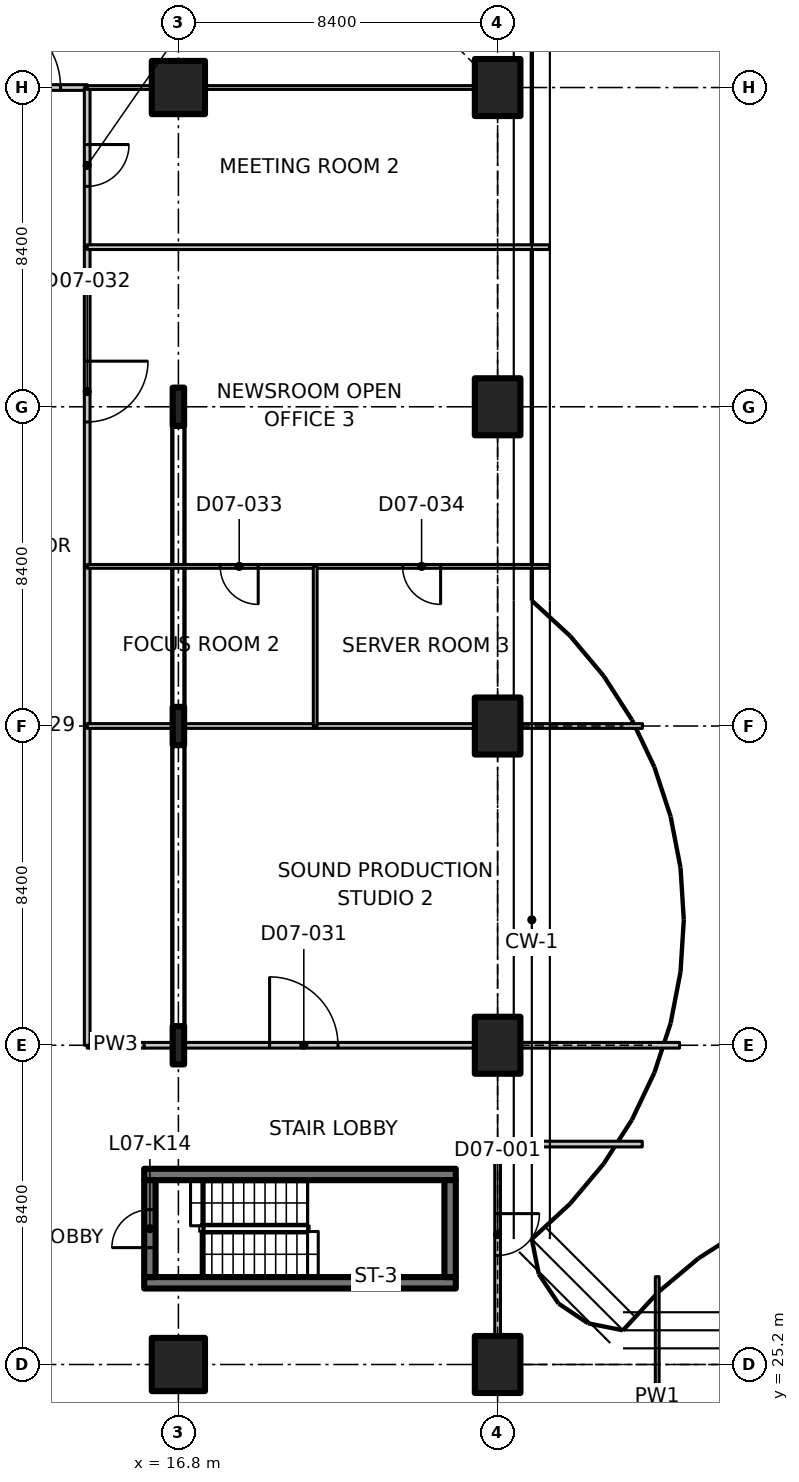
"""IFC4 building model, lengths in metres.
Left out: names, types, materials, properties, quantities, classifications, styles, units other than length and angle.
Written with IfcOpenShell. Run it as: python <this file> out.ifc"""

import sys

from ifc_helpers import new_model, si_unit, direction, frame, frame_2d, origin, origin_2d, place, context, subcontext, project, spatial, polyline, rectangle, i_section, outline, extrude, element, fill, save


model = new_model("IFC4")
c1 = context("Model", 3, precision=1e-05, world=origin(), true_north=direction((0.0, 1.0)))
c2 = subcontext(c1, "Body", "Model", "MODEL_VIEW")
j1 = project(units=[si_unit("LENGTHUNIT", "METRE"), si_unit("PLANEANGLEUNIT", "RADIAN")], contexts=[c1])
p1 = place(None, origin())
s1 = spatial("IfcSite", under=j1, at=p1, CompositionType="ELEMENT")
p2 = place(p1, origin())
s2 = spatial("IfcBuilding", under=s1, at=p2, CompositionType="ELEMENT")
p3 = place(p2, frame((0.0, 0.0, 40.1)))
s3 = spatial("IfcBuildingStorey", under=s2, at=p3, CompositionType="ELEMENT", Elevation=40.1)
for number, where, z_axis, x_axis in (
    (1, (16.8, 25.2, 0.0), (0.0, 0.0, 1.0), (1.0, 0.0, 0.0)),
    (2, (16.8, 58.8, 0.0), (0.0, 0.0, 1.0), (1.0, 0.0, 0.0)),
):
    element("IfcColumn", number, at=place(p3, frame(where, z_axis=z_axis, x_axis=x_axis)), inside=s3, PredefinedType="COLUMN", context=c2, shape_type="SweptSolid", body=[
        extrude(rectangle(XDim=1.4, YDim=1.4, at=origin_2d()), origin(), (0.0, 0.0, 1.0), 3.35),
    ])
for number, where, z_axis, x_axis in (
    (3, (25.2, 25.2, 0.0), (0.0, 0.0, 1.0), (1.0, 0.0, 0.0)),
    (4, (25.2, 33.6, 0.0), (0.0, 0.0, 1.0), (1.0, 0.0, 0.0)),
    (5, (25.2, 42.0, 0.0), (0.0, 0.0, 1.0), (1.0, 0.0, 0.0)),
    (6, (25.2, 50.4, 0.0), (0.0, 0.0, 1.0), (1.0, 0.0, 0.0)),
    (7, (25.2, 58.8, 0.0), (0.0, 0.0, 1.0), (1.0, 0.0, 0.0)),
):
    element("IfcColumn", number, at=place(p3, frame(where, z_axis=z_axis, x_axis=x_axis)), inside=s3, PredefinedType="COLUMN", context=c2, shape_type="SweptSolid", body=[
        extrude(rectangle(XDim=1.2, YDim=1.5, at=origin_2d()), origin(), (0.0, 0.0, 1.0), 3.35),
    ])
for number, where, z_axis, x_axis in (
    (8, (16.8, 33.6, -0.125), (0.0, 0.0, 1.0), (1.0, 0.0, 0.0)),
    (9, (16.8, 50.4, -0.125), (0.0, 0.0, 1.0), (1.0, 0.0, 0.0)),
    (10, (16.8, 42.0, -0.125), (0.0, 0.0, 1.0), (1.0, 0.0, 0.0)),
):
    element("IfcColumn", number, at=place(p3, frame(where, z_axis=z_axis, x_axis=x_axis)), inside=s3, PredefinedType="COLUMN", context=c2, shape_type="SweptSolid", body=[
        extrude(i_section(OverallWidth=0.302, OverallDepth=1.008, WebThickness=0.021, FlangeThickness=0.04, FilletRadius=0.03, at=origin_2d()), origin(), (0.0, 0.0, 1.0), 3.475),
    ])
for number, where, z_axis, x_axis in (
    (11, (15.9, 27.35, 0.0), (0.0, 0.0, 1.0), (1.0, 0.0, 0.0)),
    (12, (15.9, 30.2, 0.0), (0.0, 0.0, 1.0), (1.0, 0.0, 0.0)),
):
    element("IfcWall", number, at=place(p3, frame(where, z_axis=z_axis, x_axis=x_axis)), inside=s3, PredefinedType="SHEAR", context=c2, shape_type="SweptSolid", body=[
        extrude(rectangle(XDim=8.2, YDim=0.3, at=frame_2d((4.1, 0.0))), origin(), (0.0, 0.0, 1.0), 3.35),
    ])
p4 = place(p3, frame((16.05, 27.5, 0.0), z_axis=(0.0, 0.0, 1.0), x_axis=(0.0, 1.0, 0.0)))
e13 = element("IfcWall", 13, at=p4, inside=s3, PredefinedType="SHEAR", context=c2, shape_type="SweptSolid", body=[
    extrude(rectangle(XDim=2.55, YDim=0.3, at=frame_2d((1.275, 0.0))), origin(), (0.0, 0.0, 1.0), 3.35),
])
p5 = place(p4, frame((0.775, 0.0, 0.0)))
e14 = element("IfcOpeningElement", 14, at=p5, cuts=e13, PredefinedType="OPENING", context=c2, shape_type="SweptSolid", body=[
    extrude(rectangle(XDim=1.0, YDim=2.1, at=frame_2d((0.5, 1.05))), frame((0.0, 0.16, 0.0), z_axis=(0.0, -1.0, 0.0), x_axis=(1.0, 0.0, 0.0)), (0.0, 0.0, 1.0), 0.32),
])
p6 = place(p3, frame((23.95, 27.5, 0.0), z_axis=(0.0, 0.0, 1.0), x_axis=(0.0, 1.0, 0.0)))
e15 = element("IfcWall", 15, at=p6, inside=s3, PredefinedType="SHEAR", context=c2, shape_type="SweptSolid", body=[
    extrude(rectangle(XDim=2.55, YDim=0.3, at=frame_2d((1.275, 0.0))), origin(), (0.0, 0.0, 1.0), 3.35),
])
p7 = place(p3, frame((29.4, 27.511, 0.0), z_axis=(0.0, 0.0, 1.0), x_axis=(0.0, -1.0, 0.0)))
e16 = element("IfcWall", 16, at=p7, inside=s3, PredefinedType="PARTITIONING", context=c2, shape_type="SweptSolid", body=[
    extrude(outline(polyline([(0.0, 0.0), (6.311, 0.0), (6.311, 3.33), (2.761, 3.33), (2.759, 2.98), (1.863, 2.98), (1.861, 3.33), (0.236, 3.33), (0.0, 3.33), (0.0, 0.0)])), frame((0.0, 0.05, 0.0), z_axis=(0.0, -1.0, 0.0), x_axis=(1.0, 0.0, 0.0)), (0.0, 0.0, 1.0), 0.1),
])
p8 = place(p3, frame((25.2, 31.0, 0.0), z_axis=(0.0, 0.0, 1.0), x_axis=(0.0, -1.0, 0.0)))
e17 = element("IfcWall", 17, at=p8, inside=s3, PredefinedType="PARTITIONING", context=c2, shape_type="SweptSolid", body=[
    extrude(outline(polyline([(0.0, 0.0), (5.03, 0.0), (5.03, 2.98), (0.0, 2.98), (0.0, 0.0)])), frame((0.0, 0.075, 0.0), z_axis=(0.0, -1.0, 0.0), x_axis=(1.0, 0.0, 0.0)), (0.0, 0.0, 1.0), 0.15),
])
p9 = place(p8, frame((1.83, 0.0, 0.0)))
e18 = element("IfcOpeningElement", 18, at=p9, cuts=e17, PredefinedType="OPENING", context=c2, shape_type="SweptSolid", body=[
    extrude(rectangle(XDim=1.1, YDim=2.1, at=frame_2d((0.55, 1.05))), frame((0.0, 0.085, 0.0), z_axis=(0.0, -1.0, 0.0), x_axis=(1.0, 0.0, 0.0)), (0.0, 0.0, 1.0), 0.17),
])
p10 = place(p3, frame((25.2, 31.0, 0.0), z_axis=(0.0, 0.0, 1.0), x_axis=(1.0, 0.0, 0.0)))
e19 = element("IfcWall", 19, at=p10, inside=s3, PredefinedType="PARTITIONING", context=c2, shape_type="SweptSolid", body=[
    extrude(rectangle(XDim=3.806, YDim=0.15, at=frame_2d((1.903, 0.0))), origin(), (0.0, 0.0, 1.0), 2.98),
])
p11 = place(p3, frame((14.4, 33.6, 0.0), z_axis=(0.0, 0.0, 1.0), x_axis=(1.0, 0.0, 0.0)))
e20 = element("IfcWall", 20, at=p11, inside=s3, PredefinedType="PARTITIONING", context=c2, shape_type="SweptSolid", body=[
    extrude(rectangle(XDim=1.5, YDim=0.15, at=frame_2d((0.75, 0.0))), origin(), (0.0, 0.0, 1.0), 3.33),
])
p12 = place(p3, frame((15.9, 33.6, 0.0), z_axis=(0.0, 0.0, 1.0), x_axis=(1.0, 0.0, 0.0)))
e21 = element("IfcWall", 21, at=p12, inside=s3, PredefinedType="PARTITIONING", context=c2, shape_type="SweptSolid", body=[
    extrude(rectangle(XDim=8.68, YDim=0.15, at=frame_2d((4.34, 0.0))), origin(), (0.0, 0.0, 1.0), 3.33),
])
p13 = place(p12, frame((3.3, 0.0, 0.0)))
e22 = element("IfcOpeningElement", 22, at=p13, cuts=e21, PredefinedType="OPENING", context=c2, shape_type="SweptSolid", body=[
    extrude(rectangle(XDim=1.8, YDim=2.1, at=frame_2d((0.9, 1.05))), frame((0.0, 0.085, 0.0), z_axis=(0.0, -1.0, 0.0), x_axis=(1.0, 0.0, 0.0)), (0.0, 0.0, 1.0), 0.17),
])
p14 = place(p3, frame((25.82, 33.6, 0.0), z_axis=(0.0, 0.0, 1.0), x_axis=(1.0, 0.0, 0.0)))
e23 = element("IfcWall", 23, at=p14, inside=s3, PredefinedType="PARTITIONING", context=c2, shape_type="SweptSolid", body=[
    extrude(rectangle(XDim=4.168, YDim=0.15, at=frame_2d((2.084, 0.0))), origin(), (0.0, 0.0, 1.0), 2.98),
])
p15 = place(p3, frame((10.8, 58.8, 0.0), z_axis=(0.0, 0.0, 1.0), x_axis=(1.0, 0.0, 0.0)))
e24 = element("IfcWall", 24, at=p15, inside=s3, PredefinedType="PARTITIONING", context=c2, shape_type="SweptSolid", body=[
    extrude(rectangle(XDim=3.6, YDim=0.15, at=frame_2d((1.8, 0.0))), origin(), (0.0, 0.0, 1.0), 3.33),
])
p16 = place(p15, frame((0.9, 0.0, 0.0)))
e25 = element("IfcOpeningElement", 25, at=p16, cuts=e24, PredefinedType="OPENING", context=c2, shape_type="SweptSolid", body=[
    extrude(rectangle(XDim=2.0, YDim=2.4, at=frame_2d((1.0, 1.2))), frame((0.0, 0.085, 0.0), z_axis=(0.0, -1.0, 0.0), x_axis=(1.0, 0.0, 0.0)), (0.0, 0.0, 1.0), 0.17),
])
p17 = place(p3, frame((14.4, 42.0, 0.0), z_axis=(0.0, 0.0, 1.0), x_axis=(0.0, -1.0, 0.0)))
e26 = element("IfcWall", 26, at=p17, inside=s3, PredefinedType="PARTITIONING", context=c2, shape_type="SweptSolid", body=[
    extrude(rectangle(XDim=8.4, YDim=0.15, at=frame_2d((4.2, 0.0))), origin(), (0.0, 0.0, 1.0), 3.33),
])
p18 = place(p3, frame((14.4, 54.6, 0.0), z_axis=(0.0, 0.0, 1.0), x_axis=(0.0, -1.0, 0.0)))
e27 = element("IfcWall", 27, at=p18, inside=s3, PredefinedType="PARTITIONING", context=c2, shape_type="SweptSolid", body=[
    extrude(rectangle(XDim=8.4, YDim=0.15, at=frame_2d((4.2, 0.0))), origin(), (0.0, 0.0, 1.0), 3.33),
])
p19 = place(p18, frame((3.0, 0.0, 0.0)))
e28 = element("IfcOpeningElement", 28, at=p19, cuts=e27, PredefinedType="OPENING", context=c2, shape_type="SweptSolid", body=[
    extrude(rectangle(XDim=1.6, YDim=2.1, at=frame_2d((0.8, 1.05))), frame((0.0, 0.085, 0.0), z_axis=(0.0, -1.0, 0.0), x_axis=(1.0, 0.0, 0.0)), (0.0, 0.0, 1.0), 0.17),
])
p20 = place(p3, frame((14.4, 46.2, 0.0), z_axis=(0.0, 0.0, 1.0), x_axis=(0.0, -1.0, 0.0)))
e29 = element("IfcWall", 29, at=p20, inside=s3, PredefinedType="PARTITIONING", context=c2, shape_type="SweptSolid", body=[
    extrude(rectangle(XDim=4.2, YDim=0.15, at=frame_2d((2.1, 0.0))), origin(), (0.0, 0.0, 1.0), 3.33),
])
p21 = place(p3, frame((14.4, 58.8, 0.0), z_axis=(0.0, 0.0, 1.0), x_axis=(0.0, -1.0, 0.0)))
e30 = element("IfcWall", 30, at=p21, inside=s3, PredefinedType="PARTITIONING", context=c2, shape_type="SweptSolid", body=[
    extrude(rectangle(XDim=4.2, YDim=0.15, at=frame_2d((2.1, 0.0))), origin(), (0.0, 0.0, 1.0), 3.33),
])
p22 = place(p21, frame((1.5, 0.0, 0.0)))
e31 = element("IfcOpeningElement", 31, at=p22, cuts=e30, PredefinedType="OPENING", context=c2, shape_type="SweptSolid", body=[
    extrude(rectangle(XDim=1.1, YDim=2.1, at=frame_2d((0.55, 1.05))), frame((0.0, 0.085, 0.0), z_axis=(0.0, -1.0, 0.0), x_axis=(1.0, 0.0, 0.0)), (0.0, 0.0, 1.0), 0.17),
])
p23 = place(p3, frame((24.58, 58.8, 0.0), z_axis=(0.0, 0.0, 1.0), x_axis=(-1.0, 0.0, 0.0)))
e32 = element("IfcWall", 32, at=p23, inside=s3, PredefinedType="PARTITIONING", context=c2, shape_type="SweptSolid", body=[
    extrude(rectangle(XDim=7.06, YDim=0.1, at=frame_2d((3.53, 0.0))), origin(), (0.0, 0.0, 1.0), 3.33),
])
p24 = place(p3, frame((16.08, 58.8, 0.0), z_axis=(0.0, 0.0, 1.0), x_axis=(-1.0, 0.0, 0.0)))
e33 = element("IfcWall", 33, at=p24, inside=s3, PredefinedType="PARTITIONING", context=c2, shape_type="SweptSolid", body=[
    extrude(rectangle(XDim=1.68, YDim=0.1, at=frame_2d((0.84, 0.0))), origin(), (0.0, 0.0, 1.0), 3.33),
])
p25 = place(p3, frame((14.4, 42.0, 0.0), z_axis=(0.0, 0.0, 1.0), x_axis=(1.0, 0.0, 0.0)))
e34 = element("IfcWall", 34, at=p25, inside=s3, PredefinedType="PARTITIONING", context=c2, shape_type="SweptSolid", body=[
    extrude(rectangle(XDim=6.0, YDim=0.125, at=frame_2d((3.0, 0.0))), origin(), (0.0, 0.0, 1.0), 3.33),
])
p26 = place(p3, frame((20.4, 42.0, 0.0), z_axis=(0.0, 0.0, 1.0), x_axis=(1.0, 0.0, 0.0)))
e35 = element("IfcWall", 35, at=p26, inside=s3, PredefinedType="PARTITIONING", context=c2, shape_type="SweptSolid", body=[
    extrude(rectangle(XDim=4.18, YDim=0.125, at=frame_2d((2.09, 0.0))), origin(), (0.0, 0.0, 1.0), 3.33),
])
p27 = place(p3, frame((25.82, 42.0, 0.0), z_axis=(0.0, 0.0, 1.0), x_axis=(1.0, 0.0, 0.0)))
e36 = element("IfcWall", 36, at=p27, inside=s3, PredefinedType="PARTITIONING", context=c2, shape_type="SweptSolid", body=[
    extrude(rectangle(XDim=3.191, YDim=0.125, at=frame_2d((1.596, 0.0))), origin(), (0.0, 0.0, 1.0), 2.98),
])
p28 = place(p3, frame((20.4, 46.2, 0.0), z_axis=(0.0, 0.0, 1.0), x_axis=(-1.0, 0.0, 0.0)))
e37 = element("IfcWall", 37, at=p28, inside=s3, PredefinedType="PARTITIONING", context=c2, shape_type="SweptSolid", body=[
    extrude(rectangle(XDim=6.0, YDim=0.1, at=frame_2d((3.0, 0.0))), origin(), (0.0, 0.0, 1.0), 3.33),
])
p29 = place(p28, frame((1.5, 0.0, 0.0)))
e38 = element("IfcOpeningElement", 38, at=p29, cuts=e37, PredefinedType="OPENING", context=c2, shape_type="SweptSolid", body=[
    extrude(rectangle(XDim=1.0, YDim=2.1, at=frame_2d((0.5, 1.05))), frame((0.0, 0.06, 0.0), z_axis=(0.0, -1.0, 0.0), x_axis=(1.0, 0.0, 0.0)), (0.0, 0.0, 1.0), 0.12),
])
p30 = place(p3, frame((26.565, 46.2, 0.0), z_axis=(0.0, 0.0, 1.0), x_axis=(-1.0, 0.0, 0.0)))
e39 = element("IfcWall", 39, at=p30, inside=s3, PredefinedType="PARTITIONING", context=c2, shape_type="SweptSolid", body=[
    extrude(outline(polyline([(0.0, 0.0), (6.165, 0.0), (6.165, 3.33), (1.815, 3.33), (1.813, 2.98), (0.917, 2.98), (0.915, 3.33), (0.265, 3.33), (0.0, 3.33), (0.0, 0.0)])), frame((0.0, 0.05, 0.0), z_axis=(0.0, -1.0, 0.0), x_axis=(1.0, 0.0, 0.0)), (0.0, 0.0, 1.0), 0.1),
])
p31 = place(p30, frame((2.865, 0.0, 0.0)))
e40 = element("IfcOpeningElement", 40, at=p31, cuts=e39, PredefinedType="OPENING", context=c2, shape_type="SweptSolid", body=[
    extrude(rectangle(XDim=1.0, YDim=2.1, at=frame_2d((0.5, 1.05))), frame((0.0, 0.06, 0.0), z_axis=(0.0, -1.0, 0.0), x_axis=(1.0, 0.0, 0.0)), (0.0, 0.0, 1.0), 0.12),
])
p32 = place(p3, frame((14.4, 54.6, 0.0), z_axis=(0.0, 0.0, 1.0), x_axis=(1.0, 0.0, 0.0)))
e41 = element("IfcWall", 41, at=p32, inside=s3, PredefinedType="PARTITIONING", context=c2, shape_type="SweptSolid", body=[
    extrude(outline(polyline([(0.0, 0.0), (12.165, 0.0), (12.165, 3.33), (11.9, 3.33), (11.25, 3.33), (11.248, 2.98), (10.352, 2.98), (10.35, 3.33), (0.0, 3.33), (0.0, 0.0)])), frame((0.0, 0.062, 0.0), z_axis=(0.0, -1.0, 0.0), x_axis=(1.0, 0.0, 0.0)), (0.0, 0.0, 1.0), 0.125),
])
p33 = place(p3, frame((20.4, 46.2, 0.0), z_axis=(0.0, 0.0, 1.0), x_axis=(0.0, -1.0, 0.0)))
e42 = element("IfcWall", 42, at=p33, inside=s3, PredefinedType="PARTITIONING", context=c2, shape_type="SweptSolid", body=[
    extrude(rectangle(XDim=4.2, YDim=0.1, at=frame_2d((2.1, 0.0))), origin(), (0.0, 0.0, 1.0), 3.33),
])
p34 = place(p5, origin())
e43 = element("IfcDoor", 43, at=p34, inside=s3, OperationType="SINGLE_SWING_RIGHT", PredefinedType="DOOR", context=c2, shape_type="SweptSolid", body=[
    extrude(rectangle(XDim=1.0, YDim=2.1, at=frame_2d((0.5, 1.05))), frame((0.0, 0.025, 0.0), z_axis=(0.0, -1.0, 0.0), x_axis=(1.0, 0.0, 0.0)), (0.0, 0.0, 1.0), 0.05),
])
fill(e14, e43)
p35 = place(p9, origin())
e44 = element("IfcDoor", 44, at=p35, inside=s3, OperationType="SINGLE_SWING_RIGHT", PredefinedType="DOOR", context=c2, shape_type="SweptSolid", body=[
    extrude(rectangle(XDim=1.1, YDim=2.1, at=frame_2d((0.55, 1.05))), frame((0.0, 0.025, 0.0), z_axis=(0.0, -1.0, 0.0), x_axis=(1.0, 0.0, 0.0)), (0.0, 0.0, 1.0), 0.05),
])
fill(e18, e44)
p36 = place(p16, origin())
e45 = element("IfcDoor", 45, at=p36, inside=s3, OperationType="DOUBLE_DOOR_SINGLE_SWING", PredefinedType="DOOR", context=c2, shape_type="SweptSolid", body=[
    extrude(rectangle(XDim=2.0, YDim=2.4, at=frame_2d((1.0, 1.2))), frame((0.0, 0.025, 0.0), z_axis=(0.0, -1.0, 0.0), x_axis=(1.0, 0.0, 0.0)), (0.0, 0.0, 1.0), 0.05),
])
fill(e25, e45)
p37 = place(p13, origin())
e46 = element("IfcDoor", 46, at=p37, inside=s3, OperationType="DOUBLE_DOOR_SINGLE_SWING", PredefinedType="DOOR", context=c2, shape_type="SweptSolid", body=[
    extrude(rectangle(XDim=1.8, YDim=2.1, at=frame_2d((0.9, 1.05))), frame((0.0, 0.025, 0.0), z_axis=(0.0, -1.0, 0.0), x_axis=(1.0, 0.0, 0.0)), (0.0, 0.0, 1.0), 0.05),
])
fill(e22, e46)
p38 = place(p19, origin())
e47 = element("IfcDoor", 47, at=p38, inside=s3, OperationType="DOUBLE_DOOR_SINGLE_SWING", PredefinedType="DOOR", context=c2, shape_type="SweptSolid", body=[
    extrude(rectangle(XDim=1.6, YDim=2.1, at=frame_2d((0.8, 1.05))), frame((0.0, 0.025, 0.0), z_axis=(0.0, -1.0, 0.0), x_axis=(1.0, 0.0, 0.0)), (0.0, 0.0, 1.0), 0.05),
])
fill(e28, e47)
p39 = place(p29, origin())
e48 = element("IfcDoor", 48, at=p39, inside=s3, OperationType="SINGLE_SWING_LEFT", PredefinedType="DOOR", context=c2, shape_type="SweptSolid", body=[
    extrude(rectangle(XDim=1.0, YDim=2.1, at=frame_2d((0.5, 1.05))), frame((0.0, 0.025, 0.0), z_axis=(0.0, -1.0, 0.0), x_axis=(1.0, 0.0, 0.0)), (0.0, 0.0, 1.0), 0.05),
])
fill(e38, e48)
p40 = place(p31, origin())
e49 = element("IfcDoor", 49, at=p40, inside=s3, OperationType="SINGLE_SWING_LEFT", PredefinedType="DOOR", context=c2, shape_type="SweptSolid", body=[
    extrude(rectangle(XDim=1.0, YDim=2.1, at=frame_2d((0.5, 1.05))), frame((0.0, 0.025, 0.0), z_axis=(0.0, -1.0, 0.0), x_axis=(1.0, 0.0, 0.0)), (0.0, 0.0, 1.0), 0.05),
])
fill(e40, e49)
p41 = place(p22, origin())
e50 = element("IfcDoor", 50, at=p41, inside=s3, OperationType="SINGLE_SWING_LEFT", PredefinedType="DOOR", context=c2, shape_type="SweptSolid", body=[
    extrude(rectangle(XDim=1.1, YDim=2.1, at=frame_2d((0.55, 1.05))), frame((0.0, 0.025, 0.0), z_axis=(0.0, -1.0, 0.0), x_axis=(1.0, 0.0, 0.0)), (0.0, 0.0, 1.0), 0.05),
])
fill(e31, e50)
save(model, sys.argv[1])
